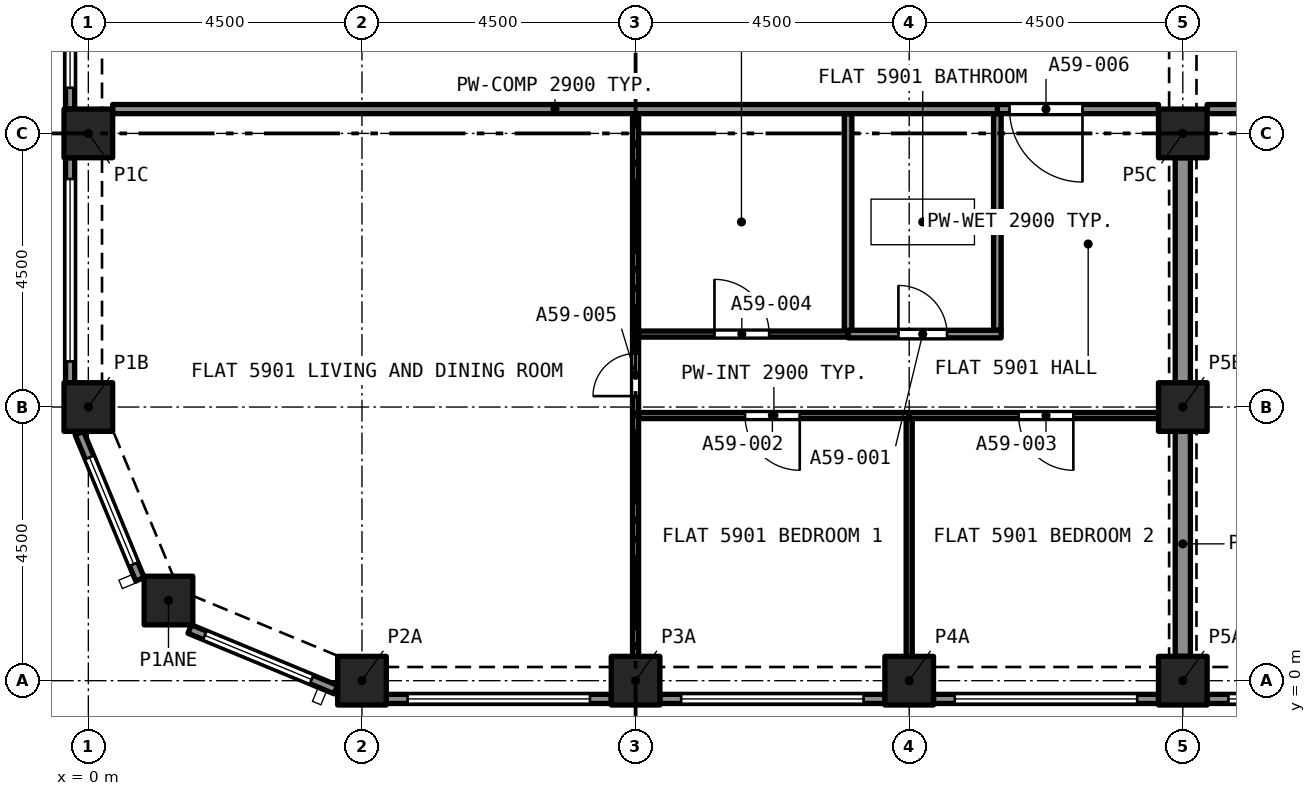
"""IFC4 building model, lengths in metres.
Left out: names, types, materials, properties, quantities, classifications, styles, units other than length and angle.
Written with IfcOpenShell. Run it as: python <this file> out.ifc"""

import sys

from ifc_helpers import new_model, si_unit, direction, frame, frame_2d, origin, origin_2d, place, context, subcontext, project, spatial, rectangle, extrude, element, fill, save


model = new_model("IFC4")
c1 = context("Model", 3, precision=1e-05, world=origin(), true_north=direction((0.0, 1.0)))
c2 = subcontext(c1, "Body", "Model", "MODEL_VIEW")
j1 = project(units=[si_unit("LENGTHUNIT", "METRE"), si_unit("PLANEANGLEUNIT", "RADIAN")], contexts=[c1])
p1 = place(None, origin())
s1 = spatial("IfcSite", under=j1, at=p1, CompositionType="ELEMENT")
p2 = place(p1, origin())
s2 = spatial("IfcBuilding", under=s1, at=p2, CompositionType="ELEMENT")
p3 = place(p2, frame((0.0, 0.0, 213.295)))
s3 = spatial("IfcBuildingStorey", under=s2, at=p3, CompositionType="ELEMENT", Elevation=213.295)
for number, where, z_axis, x_axis in (
    (1, (4.5, 0.0, 0.0), (0.0, 0.0, 1.0), (1.0, 0.0, 0.0)),
    (2, (9.0, 0.0, 0.0), (0.0, 0.0, 1.0), (1.0, 0.0, 0.0)),
    (3, (13.5, 0.0, 0.0), (0.0, 0.0, 1.0), (1.0, 0.0, 0.0)),
    (4, (18.0, 0.0, 0.0), (0.0, 0.0, 1.0), (1.0, 0.0, 0.0)),
    (5, (1.318, 1.318, 0.0), (0.0, 0.0, 1.0), (1.0, 0.0, 0.0)),
    (6, (0.0, 4.5, 0.0), (0.0, 0.0, 1.0), (1.0, 0.0, 0.0)),
    (7, (18.0, 4.5, 0.0), (0.0, 0.0, 1.0), (1.0, 0.0, 0.0)),
    (8, (0.0, 9.0, 0.0), (0.0, 0.0, 1.0), (1.0, 0.0, 0.0)),
    (9, (18.0, 9.0, 0.0), (0.0, 0.0, 1.0), (1.0, 0.0, 0.0)),
):
    element("IfcColumn", number, at=place(p3, frame(where, z_axis=z_axis, x_axis=x_axis)), inside=s3, PredefinedType="COLUMN", context=c2, shape_type="SweptSolid", body=[
        extrude(rectangle(XDim=0.8, YDim=0.8, at=origin_2d()), origin(), (0.0, 0.0, 1.0), 3.2),
    ])
p4 = place(p3, frame((-0.3, 9.4, 0.0), z_axis=(0.0, 0.0, 1.0), x_axis=(0.0, 1.0, 0.0)))
e10 = element("IfcWall", 10, at=p4, inside=s3, PredefinedType="SOLIDWALL", context=c2, shape_type="SweptSolid", body=[
    extrude(rectangle(XDim=3.7, YDim=0.15, at=frame_2d((1.85, 0.0))), origin(), (0.0, 0.0, 1.0), 3.2),
])
p5 = place(p4, frame((0.35, 0.0, 0.45)))
e11 = element("IfcOpeningElement", 11, at=p5, cuts=e10, PredefinedType="OPENING", context=c2, shape_type="SweptSolid", body=[
    extrude(rectangle(XDim=3.0, YDim=1.95, at=frame_2d((1.5, 0.975))), frame((0.0, 0.085, 0.0), z_axis=(0.0, -1.0, 0.0), x_axis=(1.0, 0.0, 0.0)), (0.0, 0.0, 1.0), 0.17),
])
p6 = place(p3, frame((-0.3, 4.9, 0.0), z_axis=(0.0, 0.0, 1.0), x_axis=(0.0, 1.0, 0.0)))
e12 = element("IfcWall", 12, at=p6, inside=s3, PredefinedType="SOLIDWALL", context=c2, shape_type="SweptSolid", body=[
    extrude(rectangle(XDim=3.7, YDim=0.15, at=frame_2d((1.85, 0.0))), origin(), (0.0, 0.0, 1.0), 3.2),
])
p7 = place(p6, frame((0.35, 0.0, 0.45)))
e13 = element("IfcOpeningElement", 13, at=p7, cuts=e12, PredefinedType="OPENING", context=c2, shape_type="SweptSolid", body=[
    extrude(rectangle(XDim=3.0, YDim=1.95, at=frame_2d((1.5, 0.975))), frame((0.0, 0.085, 0.0), z_axis=(0.0, -1.0, 0.0), x_axis=(1.0, 0.0, 0.0)), (0.0, 0.0, 1.0), 0.17),
])
p8 = place(p3, frame((0.849, 1.667, 0.0), z_axis=(0.0, 0.0, 1.0), x_axis=(-0.382669406082, 0.923885342263, 0.0)))
e14 = element("IfcWall", 14, at=p8, inside=s3, PredefinedType="SOLIDWALL", context=c2, shape_type="SweptSolid", body=[
    extrude(rectangle(XDim=2.602, YDim=0.15, at=frame_2d((1.301, 0.0))), origin(), (0.0, 0.0, 1.0), 3.2),
])
p9 = place(p8, frame((0.27, 0.0, 0.45)))
e15 = element("IfcOpeningElement", 15, at=p9, cuts=e14, PredefinedType="OPENING", context=c2, shape_type="SweptSolid", body=[
    extrude(rectangle(XDim=1.9, YDim=1.95, at=frame_2d((0.95, 0.975))), frame((0.0, 0.085, 0.0), z_axis=(0.0, -1.0, 0.0), x_axis=(1.0, 0.0, 0.0)), (0.0, 0.0, 1.0), 0.17),
])
p10 = place(p3, frame((4.071, -0.147, 0.0), z_axis=(0.0, 0.0, 1.0), x_axis=(-0.923885342263, 0.382669406082, 0.0)))
e16 = element("IfcWall", 16, at=p10, inside=s3, PredefinedType="SOLIDWALL", context=c2, shape_type="SweptSolid", body=[
    extrude(rectangle(XDim=2.602, YDim=0.15, at=frame_2d((1.301, 0.0))), origin(), (0.0, 0.0, 1.0), 3.2),
])
p11 = place(p10, frame((0.432, 0.0, 0.45)))
e17 = element("IfcOpeningElement", 17, at=p11, cuts=e16, PredefinedType="OPENING", context=c2, shape_type="SweptSolid", body=[
    extrude(rectangle(XDim=1.9, YDim=1.95, at=frame_2d((0.95, 0.975))), frame((0.0, 0.085, 0.0), z_axis=(0.0, -1.0, 0.0), x_axis=(1.0, 0.0, 0.0)), (0.0, 0.0, 1.0), 0.17),
])
p12 = place(p3, frame((8.6, -0.3, 0.0), z_axis=(0.0, 0.0, 1.0), x_axis=(-1.0, 0.0, 0.0)))
e18 = element("IfcWall", 18, at=p12, inside=s3, PredefinedType="SOLIDWALL", context=c2, shape_type="SweptSolid", body=[
    extrude(rectangle(XDim=3.7, YDim=0.15, at=frame_2d((1.85, 0.0))), origin(), (0.0, 0.0, 1.0), 3.2),
])
p13 = place(p12, frame((0.35, 0.0, 0.45)))
e19 = element("IfcOpeningElement", 19, at=p13, cuts=e18, PredefinedType="OPENING", context=c2, shape_type="SweptSolid", body=[
    extrude(rectangle(XDim=3.0, YDim=1.95, at=frame_2d((1.5, 0.975))), frame((0.0, 0.085, 0.0), z_axis=(0.0, -1.0, 0.0), x_axis=(1.0, 0.0, 0.0)), (0.0, 0.0, 1.0), 0.17),
])
p14 = place(p3, frame((13.1, -0.3, 0.0), z_axis=(0.0, 0.0, 1.0), x_axis=(-1.0, 0.0, 0.0)))
e20 = element("IfcWall", 20, at=p14, inside=s3, PredefinedType="SOLIDWALL", context=c2, shape_type="SweptSolid", body=[
    extrude(rectangle(XDim=3.7, YDim=0.15, at=frame_2d((1.85, 0.0))), origin(), (0.0, 0.0, 1.0), 3.2),
])
p15 = place(p14, frame((0.35, 0.0, 0.45)))
e21 = element("IfcOpeningElement", 21, at=p15, cuts=e20, PredefinedType="OPENING", context=c2, shape_type="SweptSolid", body=[
    extrude(rectangle(XDim=3.0, YDim=1.95, at=frame_2d((1.5, 0.975))), frame((0.0, 0.085, 0.0), z_axis=(0.0, -1.0, 0.0), x_axis=(1.0, 0.0, 0.0)), (0.0, 0.0, 1.0), 0.17),
])
p16 = place(p3, frame((17.6, -0.3, 0.0), z_axis=(0.0, 0.0, 1.0), x_axis=(-1.0, 0.0, 0.0)))
e22 = element("IfcWall", 22, at=p16, inside=s3, PredefinedType="SOLIDWALL", context=c2, shape_type="SweptSolid", body=[
    extrude(rectangle(XDim=3.7, YDim=0.15, at=frame_2d((1.85, 0.0))), origin(), (0.0, 0.0, 1.0), 3.2),
])
p17 = place(p16, frame((0.35, 0.0, 0.45)))
e23 = element("IfcOpeningElement", 23, at=p17, cuts=e22, PredefinedType="OPENING", context=c2, shape_type="SweptSolid", body=[
    extrude(rectangle(XDim=3.0, YDim=1.95, at=frame_2d((1.5, 0.975))), frame((0.0, 0.085, 0.0), z_axis=(0.0, -1.0, 0.0), x_axis=(1.0, 0.0, 0.0)), (0.0, 0.0, 1.0), 0.17),
])
p18 = place(p3, frame((22.1, -0.3, 0.0), z_axis=(0.0, 0.0, 1.0), x_axis=(-1.0, 0.0, 0.0)))
e24 = element("IfcWall", 24, at=p18, inside=s3, PredefinedType="SOLIDWALL", context=c2, shape_type="SweptSolid", body=[
    extrude(rectangle(XDim=3.7, YDim=0.15, at=frame_2d((1.85, 0.0))), origin(), (0.0, 0.0, 1.0), 3.2),
])
p19 = place(p18, frame((0.35, 0.0, 0.45)))
e25 = element("IfcOpeningElement", 25, at=p19, cuts=e24, PredefinedType="OPENING", context=c2, shape_type="SweptSolid", body=[
    extrude(rectangle(XDim=3.0, YDim=1.95, at=frame_2d((1.5, 0.975))), frame((0.0, 0.085, 0.0), z_axis=(0.0, -1.0, 0.0), x_axis=(1.0, 0.0, 0.0)), (0.0, 0.0, 1.0), 0.17),
])
p20 = place(p3, frame((14.95, 5.762, 0.0), z_axis=(0.0, 0.0, 1.0), x_axis=(0.0, 1.0, 0.0)))
e26 = element("IfcWall", 26, at=p20, inside=s3, PredefinedType="PARTITIONING", context=c2, shape_type="SweptSolid", body=[
    extrude(rectangle(XDim=3.562, YDim=0.125, at=frame_2d((1.781, 0.0))), origin(), (0.0, 0.0, 1.0), 2.9),
])
p21 = place(p3, frame((12.495, 5.7, 0.0), z_axis=(0.0, 0.0, 1.0), x_axis=(1.0, 0.0, 0.0)))
e27 = element("IfcWall", 27, at=p21, inside=s3, PredefinedType="PARTITIONING", context=c2, shape_type="SweptSolid", body=[
    extrude(rectangle(XDim=2.518, YDim=0.125, at=frame_2d((1.259, 0.0))), origin(), (0.0, 0.0, 1.0), 2.9),
])
p22 = place(p21, frame((0.828, 0.0, 0.0)))
e28 = element("IfcOpeningElement", 28, at=p22, cuts=e27, PredefinedType="OPENING", context=c2, shape_type="SweptSolid", body=[
    extrude(rectangle(XDim=0.8, YDim=2.1, at=frame_2d((0.4, 1.05))), frame((0.0, 0.073, 0.0), z_axis=(0.0, -1.0, 0.0), x_axis=(1.0, 0.0, 0.0)), (0.0, 0.0, 1.0), 0.145),
])
p23 = place(p3, frame((12.495, 5.762, 0.0), z_axis=(0.0, 0.0, 1.0), x_axis=(0.0, 1.0, 0.0)))
e29 = element("IfcWall", 29, at=p23, inside=s3, PredefinedType="PARTITIONING", context=c2, shape_type="SweptSolid", body=[
    extrude(rectangle(XDim=3.562, YDim=0.125, at=frame_2d((1.781, 0.0))), origin(), (0.0, 0.0, 1.0), 2.9),
])
p24 = place(p3, frame((13.5, 0.4, 0.0), z_axis=(0.0, 0.0, 1.0), x_axis=(0.0, 1.0, 0.0)))
e30 = element("IfcWall", 30, at=p24, inside=s3, PredefinedType="PARTITIONING", context=c2, shape_type="SweptSolid", body=[
    extrude(rectangle(XDim=3.91, YDim=0.1, at=frame_2d((1.955, 0.0))), origin(), (0.0, 0.0, 1.0), 2.9),
])
p25 = place(p3, frame((13.5, 4.36, 0.0), z_axis=(0.0, 0.0, 1.0), x_axis=(-1.0, 0.0, 0.0)))
e31 = element("IfcWall", 31, at=p25, inside=s3, PredefinedType="PARTITIONING", context=c2, shape_type="SweptSolid", body=[
    extrude(rectangle(XDim=4.45, YDim=0.1, at=frame_2d((2.225, 0.0))), origin(), (0.0, 0.0, 1.0), 2.9),
])
p26 = place(p25, frame((1.8, 0.0, 0.0)))
e32 = element("IfcOpeningElement", 32, at=p26, cuts=e31, PredefinedType="OPENING", context=c2, shape_type="SweptSolid", body=[
    extrude(rectangle(XDim=0.9, YDim=2.1, at=frame_2d((0.45, 1.05))), frame((0.0, 0.06, 0.0), z_axis=(0.0, -1.0, 0.0), x_axis=(1.0, 0.0, 0.0)), (0.0, 0.0, 1.0), 0.12),
])
p27 = place(p3, frame((9.0, 0.4, 0.0), z_axis=(0.0, 0.0, 1.0), x_axis=(0.0, 1.0, 0.0)))
e33 = element("IfcWall", 33, at=p27, inside=s3, PredefinedType="PARTITIONING", context=c2, shape_type="SweptSolid", body=[
    extrude(rectangle(XDim=3.96, YDim=0.1, at=frame_2d((1.98, 0.0))), origin(), (0.0, 0.0, 1.0), 2.9),
])
p28 = place(p3, frame((17.6, 4.36, 0.0), z_axis=(0.0, 0.0, 1.0), x_axis=(-1.0, 0.0, 0.0)))
e34 = element("IfcWall", 34, at=p28, inside=s3, PredefinedType="PARTITIONING", context=c2, shape_type="SweptSolid", body=[
    extrude(rectangle(XDim=4.1, YDim=0.1, at=frame_2d((2.05, 0.0))), origin(), (0.0, 0.0, 1.0), 2.9),
])
p29 = place(p28, frame((1.4, 0.0, 0.0)))
e35 = element("IfcOpeningElement", 35, at=p29, cuts=e34, PredefinedType="OPENING", context=c2, shape_type="SweptSolid", body=[
    extrude(rectangle(XDim=0.9, YDim=2.1, at=frame_2d((0.45, 1.05))), frame((0.0, 0.06, 0.0), z_axis=(0.0, -1.0, 0.0), x_axis=(1.0, 0.0, 0.0)), (0.0, 0.0, 1.0), 0.12),
])
p30 = place(p3, frame((18.0, 0.4, 0.0), z_axis=(0.0, 0.0, 1.0), x_axis=(0.0, 1.0, 0.0)))
e36 = element("IfcWall", 36, at=p30, inside=s3, PredefinedType="PARTITIONING", context=c2, shape_type="SweptSolid", body=[
    extrude(rectangle(XDim=3.7, YDim=0.25, at=frame_2d((1.85, 0.0))), origin(), (0.0, 0.0, 1.0), 2.38),
])
p31 = place(p3, frame((9.05, 5.7, 0.0), z_axis=(0.0, 0.0, 1.0), x_axis=(1.0, 0.0, 0.0)))
e37 = element("IfcWall", 37, at=p31, inside=s3, PredefinedType="PARTITIONING", context=c2, shape_type="SweptSolid", body=[
    extrude(rectangle(XDim=3.445, YDim=0.1, at=frame_2d((1.722, 0.0))), origin(), (0.0, 0.0, 1.0), 2.9),
])
p32 = place(p31, frame((1.247, 0.0, 0.0)))
e38 = element("IfcOpeningElement", 38, at=p32, cuts=e37, PredefinedType="OPENING", context=c2, shape_type="SweptSolid", body=[
    extrude(rectangle(XDim=0.9, YDim=2.1, at=frame_2d((0.45, 1.05))), frame((0.0, 0.06, 0.0), z_axis=(0.0, -1.0, 0.0), x_axis=(1.0, 0.0, 0.0)), (0.0, 0.0, 1.0), 0.12),
])
p33 = place(p3, frame((9.0, 4.36, 0.0), z_axis=(0.0, 0.0, 1.0), x_axis=(0.0, 1.0, 0.0)))
e39 = element("IfcWall", 39, at=p33, inside=s3, PredefinedType="PARTITIONING", context=c2, shape_type="SweptSolid", body=[
    extrude(rectangle(XDim=1.34, YDim=0.1, at=frame_2d((0.67, 0.0))), origin(), (0.0, 0.0, 1.0), 2.9),
])
p34 = place(p33, frame((0.32, 0.0, 0.0)))
e40 = element("IfcOpeningElement", 40, at=p34, cuts=e39, PredefinedType="OPENING", context=c2, shape_type="SweptSolid", body=[
    extrude(rectangle(XDim=0.7, YDim=2.1, at=frame_2d((0.35, 1.05))), frame((0.0, 0.06, 0.0), z_axis=(0.0, -1.0, 0.0), x_axis=(1.0, 0.0, 0.0)), (0.0, 0.0, 1.0), 0.12),
])
p35 = place(p3, frame((18.0, 4.9, 0.0), z_axis=(0.0, 0.0, 1.0), x_axis=(0.0, 1.0, 0.0)))
e41 = element("IfcWall", 41, at=p35, inside=s3, PredefinedType="PARTITIONING", context=c2, shape_type="SweptSolid", body=[
    extrude(rectangle(XDim=3.7, YDim=0.25, at=frame_2d((1.85, 0.0))), origin(), (0.0, 0.0, 1.0), 2.38),
])
p36 = place(p3, frame((17.6, 9.4, 0.0), z_axis=(0.0, 0.0, 1.0), x_axis=(-1.0, 0.0, 0.0)))
e42 = element("IfcWall", 42, at=p36, inside=s3, PredefinedType="PARTITIONING", context=c2, shape_type="SweptSolid", body=[
    extrude(rectangle(XDim=2.65, YDim=0.15, at=frame_2d((1.325, 0.0))), origin(), (0.0, 0.0, 1.0), 2.9),
])
p37 = place(p36, frame((1.25, 0.0, 0.0)))
e43 = element("IfcOpeningElement", 43, at=p37, cuts=e42, PredefinedType="OPENING", context=c2, shape_type="SweptSolid", body=[
    extrude(rectangle(XDim=1.2, YDim=2.4, at=frame_2d((0.6, 1.2))), frame((0.0, 0.085, 0.0), z_axis=(0.0, -1.0, 0.0), x_axis=(1.0, 0.0, 0.0)), (0.0, 0.0, 1.0), 0.17),
])
p38 = place(p3, frame((9.0, 5.7, 0.0), z_axis=(0.0, 0.0, 1.0), x_axis=(0.0, 1.0, 0.0)))
e44 = element("IfcWall", 44, at=p38, inside=s3, PredefinedType="PARTITIONING", context=c2, shape_type="SweptSolid", body=[
    extrude(rectangle(XDim=3.625, YDim=0.1, at=frame_2d((1.812, 0.0))), origin(), (0.0, 0.0, 1.0), 2.9),
])
p39 = place(p3, frame((0.4, 9.4, 0.0), z_axis=(0.0, 0.0, 1.0), x_axis=(1.0, 0.0, 0.0)))
e45 = element("IfcWall", 45, at=p39, inside=s3, PredefinedType="PARTITIONING", context=c2, shape_type="SweptSolid", body=[
    extrude(rectangle(XDim=14.55, YDim=0.15, at=frame_2d((7.275, 0.0))), origin(), (0.0, 0.0, 1.0), 2.9),
])
p40 = place(p3, frame((27.0, 9.4, 0.0), z_axis=(0.0, 0.0, 1.0), x_axis=(-1.0, 0.0, 0.0)))
e46 = element("IfcWall", 46, at=p40, inside=s3, PredefinedType="PARTITIONING", context=c2, shape_type="SweptSolid", body=[
    extrude(rectangle(XDim=8.6, YDim=0.15, at=frame_2d((4.3, 0.0))), origin(), (0.0, 0.0, 1.0), 2.75),
])
p41 = place(p40, frame((4.0, 0.0, 0.0)))
e47 = element("IfcOpeningElement", 47, at=p41, cuts=e46, PredefinedType="OPENING", context=c2, shape_type="SweptSolid", body=[
    extrude(rectangle(XDim=1.0, YDim=2.1, at=frame_2d((0.5, 1.05))), frame((0.0, 0.085, 0.0), z_axis=(0.0, -1.0, 0.0), x_axis=(1.0, 0.0, 0.0)), (0.0, 0.0, 1.0), 0.17),
])
p42 = place(p5, origin())
e48 = element("IfcWindow", 48, at=p42, inside=s3, PartitioningType="SINGLE_PANEL", PredefinedType="WINDOW", context=c2, shape_type="SweptSolid", body=[
    extrude(rectangle(XDim=3.0, YDim=1.95, at=frame_2d((1.5, 0.975))), frame((0.0, 0.03, 0.0), z_axis=(0.0, -1.0, 0.0), x_axis=(1.0, 0.0, 0.0)), (0.0, 0.0, 1.0), 0.06),
])
fill(e11, e48)
p43 = place(p7, origin())
e49 = element("IfcWindow", 49, at=p43, inside=s3, PartitioningType="SINGLE_PANEL", PredefinedType="WINDOW", context=c2, shape_type="SweptSolid", body=[
    extrude(rectangle(XDim=3.0, YDim=1.95, at=frame_2d((1.5, 0.975))), frame((0.0, 0.03, 0.0), z_axis=(0.0, -1.0, 0.0), x_axis=(1.0, 0.0, 0.0)), (0.0, 0.0, 1.0), 0.06),
])
fill(e13, e49)
p44 = place(p9, origin())
e50 = element("IfcWindow", 50, at=p44, inside=s3, PartitioningType="SINGLE_PANEL", PredefinedType="WINDOW", context=c2, shape_type="SweptSolid", body=[
    extrude(rectangle(XDim=1.9, YDim=1.95, at=frame_2d((0.95, 0.975))), frame((0.0, 0.03, 0.0), z_axis=(0.0, -1.0, 0.0), x_axis=(1.0, 0.0, 0.0)), (0.0, 0.0, 1.0), 0.06),
])
fill(e15, e50)
p45 = place(p11, origin())
e51 = element("IfcWindow", 51, at=p45, inside=s3, PartitioningType="SINGLE_PANEL", PredefinedType="WINDOW", context=c2, shape_type="SweptSolid", body=[
    extrude(rectangle(XDim=1.9, YDim=1.95, at=frame_2d((0.95, 0.975))), frame((0.0, 0.03, 0.0), z_axis=(0.0, -1.0, 0.0), x_axis=(1.0, 0.0, 0.0)), (0.0, 0.0, 1.0), 0.06),
])
fill(e17, e51)
p46 = place(p13, origin())
e52 = element("IfcWindow", 52, at=p46, inside=s3, PartitioningType="SINGLE_PANEL", PredefinedType="WINDOW", context=c2, shape_type="SweptSolid", body=[
    extrude(rectangle(XDim=3.0, YDim=1.95, at=frame_2d((1.5, 0.975))), frame((0.0, 0.03, 0.0), z_axis=(0.0, -1.0, 0.0), x_axis=(1.0, 0.0, 0.0)), (0.0, 0.0, 1.0), 0.06),
])
fill(e19, e52)
p47 = place(p15, origin())
e53 = element("IfcWindow", 53, at=p47, inside=s3, PartitioningType="SINGLE_PANEL", PredefinedType="WINDOW", context=c2, shape_type="SweptSolid", body=[
    extrude(rectangle(XDim=3.0, YDim=1.95, at=frame_2d((1.5, 0.975))), frame((0.0, 0.03, 0.0), z_axis=(0.0, -1.0, 0.0), x_axis=(1.0, 0.0, 0.0)), (0.0, 0.0, 1.0), 0.06),
])
fill(e21, e53)
p48 = place(p17, origin())
e54 = element("IfcWindow", 54, at=p48, inside=s3, PartitioningType="SINGLE_PANEL", PredefinedType="WINDOW", context=c2, shape_type="SweptSolid", body=[
    extrude(rectangle(XDim=3.0, YDim=1.95, at=frame_2d((1.5, 0.975))), frame((0.0, 0.03, 0.0), z_axis=(0.0, -1.0, 0.0), x_axis=(1.0, 0.0, 0.0)), (0.0, 0.0, 1.0), 0.06),
])
fill(e23, e54)
p49 = place(p19, origin())
e55 = element("IfcWindow", 55, at=p49, inside=s3, PartitioningType="SINGLE_PANEL", PredefinedType="WINDOW", context=c2, shape_type="SweptSolid", body=[
    extrude(rectangle(XDim=3.0, YDim=1.95, at=frame_2d((1.5, 0.975))), frame((0.0, 0.03, 0.0), z_axis=(0.0, -1.0, 0.0), x_axis=(1.0, 0.0, 0.0)), (0.0, 0.0, 1.0), 0.06),
])
fill(e25, e55)
p50 = place(p22, origin())
e56 = element("IfcDoor", 56, at=p50, inside=s3, OperationType="SINGLE_SWING_LEFT", PredefinedType="DOOR", context=c2, shape_type="SweptSolid", body=[
    extrude(rectangle(XDim=0.8, YDim=2.1, at=frame_2d((0.4, 1.05))), frame((0.0, 0.025, 0.0), z_axis=(0.0, -1.0, 0.0), x_axis=(1.0, 0.0, 0.0)), (0.0, 0.0, 1.0), 0.05),
])
fill(e28, e56)
p51 = place(p26, origin())
e57 = element("IfcDoor", 57, at=p51, inside=s3, OperationType="SINGLE_SWING_RIGHT", PredefinedType="DOOR", context=c2, shape_type="SweptSolid", body=[
    extrude(rectangle(XDim=0.9, YDim=2.1, at=frame_2d((0.45, 1.05))), frame((0.0, 0.025, 0.0), z_axis=(0.0, -1.0, 0.0), x_axis=(1.0, 0.0, 0.0)), (0.0, 0.0, 1.0), 0.05),
])
fill(e32, e57)
p52 = place(p29, origin())
e58 = element("IfcDoor", 58, at=p52, inside=s3, OperationType="SINGLE_SWING_LEFT", PredefinedType="DOOR", context=c2, shape_type="SweptSolid", body=[
    extrude(rectangle(XDim=0.9, YDim=2.1, at=frame_2d((0.45, 1.05))), frame((0.0, 0.025, 0.0), z_axis=(0.0, -1.0, 0.0), x_axis=(1.0, 0.0, 0.0)), (0.0, 0.0, 1.0), 0.05),
])
fill(e35, e58)
p53 = place(p32, origin())
e59 = element("IfcDoor", 59, at=p53, inside=s3, OperationType="SINGLE_SWING_LEFT", PredefinedType="DOOR", context=c2, shape_type="SweptSolid", body=[
    extrude(rectangle(XDim=0.9, YDim=2.1, at=frame_2d((0.45, 1.05))), frame((0.0, 0.025, 0.0), z_axis=(0.0, -1.0, 0.0), x_axis=(1.0, 0.0, 0.0)), (0.0, 0.0, 1.0), 0.05),
])
fill(e38, e59)
p54 = place(p34, origin())
e60 = element("IfcDoor", 60, at=p54, inside=s3, OperationType="SINGLE_SWING_LEFT", PredefinedType="DOOR", context=c2, shape_type="SweptSolid", body=[
    extrude(rectangle(XDim=0.7, YDim=2.1, at=frame_2d((0.35, 1.05))), frame((0.0, 0.025, 0.0), z_axis=(0.0, -1.0, 0.0), x_axis=(1.0, 0.0, 0.0)), (0.0, 0.0, 1.0), 0.05),
])
fill(e40, e60)
p55 = place(p37, origin())
e61 = element("IfcDoor", 61, at=p55, inside=s3, OperationType="SINGLE_SWING_RIGHT", PredefinedType="DOOR", context=c2, shape_type="SweptSolid", body=[
    extrude(rectangle(XDim=1.2, YDim=2.4, at=frame_2d((0.6, 1.2))), frame((0.0, 0.025, 0.0), z_axis=(0.0, -1.0, 0.0), x_axis=(1.0, 0.0, 0.0)), (0.0, 0.0, 1.0), 0.05),
])
fill(e43, e61)
save(model, sys.argv[1])
